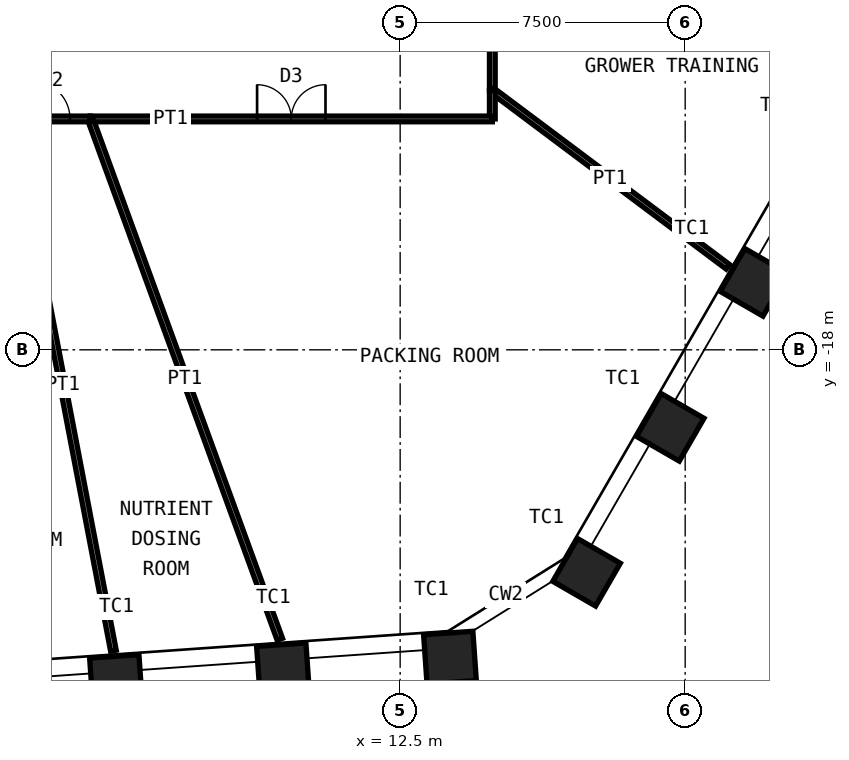
"""IFC4 building model, lengths in metres.
Left out: names, types, materials, properties, quantities, classifications, styles, units other than length and angle.
Written with IfcOpenShell. Run it as: python <this file> out.ifc"""

import sys

from ifc_helpers import new_model, si_unit, direction, frame, frame_2d, origin, origin_2d, place, context, subcontext, project, spatial, rectangle, hollow_rectangle, extrude, element, fill, save


model = new_model("IFC4")
c1 = context("Model", 3, precision=1e-05, world=origin(), true_north=direction((0.0, 1.0)))
c2 = subcontext(c1, "Body", "Model", "MODEL_VIEW")
j1 = project(units=[si_unit("LENGTHUNIT", "METRE"), si_unit("PLANEANGLEUNIT", "RADIAN")], contexts=[c1])
p1 = place(None, origin())
s1 = spatial("IfcSite", under=j1, at=p1, CompositionType="ELEMENT")
p2 = place(p1, origin())
s2 = spatial("IfcBuilding", under=s1, at=p2, CompositionType="ELEMENT")
p3 = place(p2, frame((0.0, 0.0, 22.0)))
s3 = spatial("IfcBuildingStorey", under=s2, at=p3, CompositionType="ELEMENT", Elevation=22.0)
for number, where, z_axis, x_axis in (
    (1, (21.809, -16.225, 0.0), (0.0, 0.0, 1.0), (0.5, 0.866, 0.0)),
    (2, (19.607, -20.04, 0.0), (0.0, 0.0, 1.0), (0.5, 0.866, 0.0)),
    (3, (17.405, -23.854, 0.0), (0.0, 0.0, 1.0), (0.5, 0.866, 0.0)),
    (4, (13.811, -26.1, 0.0), (0.0, 0.0, 1.0), (0.998, 0.07, 0.0)),
    (5, (9.417, -26.407, 0.0), (0.0, 0.0, 1.0), (0.998, 0.07, 0.0)),
    (6, (5.023, -26.715, 0.0), (0.0, 0.0, 1.0), (0.998, 0.07, 0.0)),
):
    element("IfcColumn", number, at=place(p3, frame(where, z_axis=z_axis, x_axis=x_axis)), inside=s3, PredefinedType="COLUMN", context=c2, shape_type="SweptSolid", body=[
        extrude(hollow_rectangle(XDim=1.3, YDim=1.3, WallThickness=0.1, at=origin_2d()), origin(), (0.0, 0.0, 1.0), 5.0),
    ])
p4 = place(p3, frame((14.925, -4.806, 0.0), z_axis=(0.0, 0.0, 1.0), x_axis=(0.0, -1.0, 0.0)))
e7 = element("IfcWall", 7, at=p4, inside=s3, PredefinedType="PARTITIONING", context=c2, shape_type="SweptSolid", body=[
    extrude(rectangle(XDim=6.369, YDim=0.15, at=frame_2d((3.184, 0.0))), origin(), (0.0, 0.0, 1.0), 4.8),
])
p5 = place(p4, frame((2.684, 0.0, 0.0)))
e8 = element("IfcOpeningElement", 8, at=p5, cuts=e7, PredefinedType="OPENING", context=c2, shape_type="SweptSolid", body=[
    extrude(rectangle(XDim=1.0, YDim=2.4, at=frame_2d((0.5, 1.2))), frame((0.0, 0.085, 0.0), z_axis=(0.0, -1.0, 0.0), x_axis=(1.0, 0.0, 0.0)), (0.0, 0.0, 1.0), 0.17),
])
p6 = place(p3, frame((21.123, -15.815, 0.0), z_axis=(0.0, 0.0, 1.0), x_axis=(-0.800487841468, 0.59934899321, 0.0)))
e9 = element("IfcWall", 9, at=p6, inside=s3, PredefinedType="PARTITIONING", context=c2, shape_type="SweptSolid", body=[
    extrude(rectangle(XDim=7.743, YDim=0.15, at=frame_2d((3.871, 0.0))), origin(), (0.0, 0.0, 1.0), 3.7),
])
p7 = place(p3, frame((14.925, -11.175, 0.0), z_axis=(0.0, 0.0, 1.0), x_axis=(0.0, -1.0, 0.0)))
e10 = element("IfcWall", 10, at=p7, inside=s3, PredefinedType="PARTITIONING", context=c2, shape_type="SweptSolid", body=[
    extrude(rectangle(XDim=0.75, YDim=0.15, at=frame_2d((0.375, 0.0))), origin(), (0.0, 0.0, 1.0), 4.8),
])
p8 = place(p3, frame((14.925, -11.925, 0.0), z_axis=(0.0, 0.0, 1.0), x_axis=(-1.0, 0.0, 0.0)))
e11 = element("IfcWall", 11, at=p8, inside=s3, PredefinedType="PARTITIONING", context=c2, shape_type="SweptSolid", body=[
    extrude(rectangle(XDim=10.58, YDim=0.15, at=frame_2d((5.29, 0.0))), origin(), (0.0, 0.0, 1.0), 4.8),
])
p9 = place(p8, frame((4.39, 0.0, 0.0)))
e12 = element("IfcOpeningElement", 12, at=p9, cuts=e11, PredefinedType="OPENING", context=c2, shape_type="SweptSolid", body=[
    extrude(rectangle(XDim=1.8, YDim=2.4, at=frame_2d((0.9, 1.2))), frame((0.0, 0.085, 0.0), z_axis=(0.0, -1.0, 0.0), x_axis=(1.0, 0.0, 0.0)), (0.0, 0.0, 1.0), 0.17),
])
p10 = place(p3, frame((9.333, -25.615, 0.0), z_axis=(0.0, 0.0, 1.0), x_axis=(-0.342351086478, 0.939572101324, 0.0)))
e13 = element("IfcWall", 13, at=p10, inside=s3, PredefinedType="PARTITIONING", context=c2, shape_type="SweptSolid", body=[
    extrude(rectangle(XDim=14.571, YDim=0.15, at=frame_2d((7.285, 0.0))), origin(), (0.0, 0.0, 1.0), 3.7),
])
p11 = place(p3, frame((4.345, -11.925, 0.0), z_axis=(0.0, 0.0, 1.0), x_axis=(-1.0, 0.0, 0.0)))
e14 = element("IfcWall", 14, at=p11, inside=s3, PredefinedType="PARTITIONING", context=c2, shape_type="SweptSolid", body=[
    extrude(rectangle(XDim=2.065, YDim=0.15, at=frame_2d((1.033, 0.0))), origin(), (0.0, 0.0, 1.0), 4.8),
])
p12 = place(p11, frame((0.533, 0.0, 0.0)))
e15 = element("IfcOpeningElement", 15, at=p12, cuts=e14, PredefinedType="OPENING", context=c2, shape_type="SweptSolid", body=[
    extrude(rectangle(XDim=1.0, YDim=2.4, at=frame_2d((0.5, 1.2))), frame((0.0, 0.085, 0.0), z_axis=(0.0, -1.0, 0.0), x_axis=(1.0, 0.0, 0.0)), (0.0, 0.0, 1.0), 0.17),
])
p13 = place(p3, frame((4.955, -25.918, 0.0), z_axis=(0.0, 0.0, 1.0), x_axis=(-0.187784559803, 0.982210241801, 0.0)))
e16 = element("IfcWall", 16, at=p13, inside=s3, PredefinedType="PARTITIONING", context=c2, shape_type="SweptSolid", body=[
    extrude(rectangle(XDim=14.247, YDim=0.15, at=frame_2d((7.123, 0.0))), origin(), (0.0, 0.0, 1.0), 3.7),
])
p14 = place(p9, origin())
e17 = element("IfcDoor", 17, at=p14, inside=s3, OperationType="DOUBLE_DOOR_DOUBLE_SWING", PredefinedType="DOOR", context=c2, shape_type="SweptSolid", body=[
    extrude(rectangle(XDim=1.8, YDim=2.4, at=frame_2d((0.9, 1.2))), frame((0.0, 0.025, 0.0), z_axis=(0.0, -1.0, 0.0), x_axis=(1.0, 0.0, 0.0)), (0.0, 0.0, 1.0), 0.05),
])
fill(e12, e17)
p15 = place(p12, origin())
e18 = element("IfcDoor", 18, at=p15, inside=s3, OperationType="SINGLE_SWING_RIGHT", PredefinedType="DOOR", context=c2, shape_type="SweptSolid", body=[
    extrude(rectangle(XDim=1.0, YDim=2.4, at=frame_2d((0.5, 1.2))), frame((0.0, 0.025, 0.0), z_axis=(0.0, -1.0, 0.0), x_axis=(1.0, 0.0, 0.0)), (0.0, 0.0, 1.0), 0.05),
])
fill(e15, e18)
save(model, sys.argv[1])
